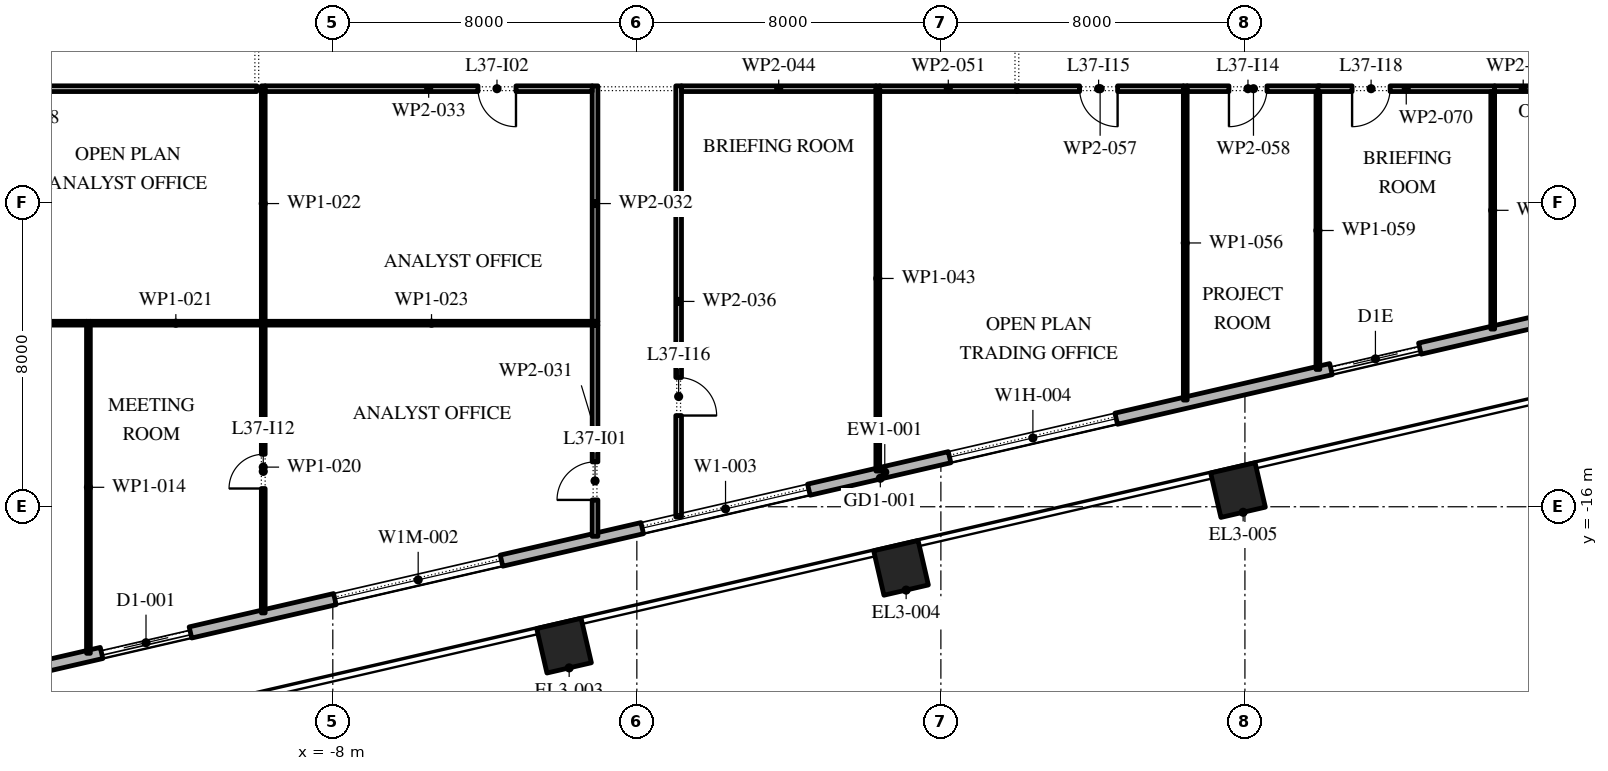
"""IFC4 building model, lengths in metres.
Left out: names, types, materials, properties, quantities, classifications, styles, units other than length and angle.
Written with IfcOpenShell. Run it as: python <this file> out.ifc"""

import sys

from ifc_helpers import new_model, si_unit, direction, frame, frame_2d, origin, origin_2d, place, context, subcontext, project, spatial, rectangle, extrude, element, fill, save


model = new_model("IFC4")
c1 = context("Model", 3, precision=1e-05, world=origin(), true_north=direction((0.0, 1.0)))
c2 = subcontext(c1, "Body", "Model", "MODEL_VIEW")
j1 = project(units=[si_unit("LENGTHUNIT", "METRE"), si_unit("PLANEANGLEUNIT", "RADIAN")], contexts=[c1])
p1 = place(None, origin())
s1 = spatial("IfcSite", under=j1, at=p1, CompositionType="ELEMENT")
p2 = place(p1, origin())
s2 = spatial("IfcBuilding", under=s1, at=p2, CompositionType="ELEMENT")
p3 = place(p2, frame((0.0, 0.0, 171.6)))
s3 = spatial("IfcBuildingStorey", under=s2, at=p3, CompositionType="ELEMENT", Elevation=171.6)
for number, where, z_axis, x_axis in (
    (1, (-1.916, -19.655, 0.0), (0.0, 0.0, 1.0), (0.974, 0.225, 0.0)),
    (2, (6.951, -17.608, 0.0), (0.0, 0.0, 1.0), (0.974, 0.225, 0.0)),
    (3, (15.818, -15.561, 0.0), (0.0, 0.0, 1.0), (0.974, 0.225, 0.0)),
):
    element("IfcColumn", number, at=place(p3, frame(where, z_axis=z_axis, x_axis=x_axis)), inside=s3, PredefinedType="COLUMN", context=c2, shape_type="SweptSolid", body=[
        extrude(rectangle(XDim=1.2, YDim=1.2, at=origin_2d()), origin(), (0.0, 0.0, 1.0), 4.2),
    ])
p4 = place(p3, frame((-17.592, -20.657, 0.0), z_axis=(0.0, 0.0, 1.0), x_axis=(0.974370243697, 0.224950279389, 0.0)))
e4 = element("IfcWall", 4, at=p4, inside=s3, PredefinedType="STANDARD", context=c2, shape_type="SweptSolid", body=[
    extrude(rectangle(XDim=49.5, YDim=0.3, at=frame_2d((24.75, 0.0))), origin(), (0.0, 0.0, 1.0), 4.0),
])
p5 = place(p4, frame((3.6, 0.0, 0.0)))
e5 = element("IfcOpeningElement", 5, at=p5, cuts=e4, PredefinedType="OPENING", context=c2, shape_type="SweptSolid", body=[
    extrude(rectangle(XDim=2.4, YDim=3.5, at=frame_2d((1.2, 1.75))), frame((0.0, 0.16, 0.0), z_axis=(0.0, -1.0, 0.0), x_axis=(1.0, 0.0, 0.0)), (0.0, 0.0, 1.0), 0.32),
])
p6 = place(p4, frame((9.9, 0.0, 0.45)))
e6 = element("IfcOpeningElement", 6, at=p6, cuts=e4, PredefinedType="OPENING", context=c2, shape_type="SweptSolid", body=[
    extrude(rectangle(XDim=4.5, YDim=2.575, at=frame_2d((2.25, 1.288))), frame((0.0, 0.16, 0.0), z_axis=(0.0, -1.0, 0.0), x_axis=(1.0, 0.0, 0.0)), (0.0, 0.0, 1.0), 0.32),
])
p7 = place(p4, frame((18.2, 0.0, 0.45)))
e7 = element("IfcOpeningElement", 7, at=p7, cuts=e4, PredefinedType="OPENING", context=c2, shape_type="SweptSolid", body=[
    extrude(rectangle(XDim=4.5, YDim=3.05, at=frame_2d((2.25, 1.525))), frame((0.0, 0.16, 0.0), z_axis=(0.0, -1.0, 0.0), x_axis=(1.0, 0.0, 0.0)), (0.0, 0.0, 1.0), 0.32),
])
p8 = place(p4, frame((26.5, 0.0, 0.45)))
e8 = element("IfcOpeningElement", 8, at=p8, cuts=e4, PredefinedType="OPENING", context=c2, shape_type="SweptSolid", body=[
    extrude(rectangle(XDim=4.5, YDim=2.75, at=frame_2d((2.25, 1.375))), frame((0.0, 0.16, 0.0), z_axis=(0.0, -1.0, 0.0), x_axis=(1.0, 0.0, 0.0)), (0.0, 0.0, 1.0), 0.32),
])
p9 = place(p4, frame((36.8, 0.0, 0.0)))
e9 = element("IfcOpeningElement", 9, at=p9, cuts=e4, PredefinedType="OPENING", context=c2, shape_type="SweptSolid", body=[
    extrude(rectangle(XDim=2.4, YDim=3.275, at=frame_2d((1.2, 1.637))), frame((0.0, 0.16, 0.0), z_axis=(0.0, -1.0, 0.0), x_axis=(1.0, 0.0, 0.0)), (0.0, 0.0, 1.0), 0.32),
])
p10 = place(p4, frame((43.1, 0.0, 0.45)))
e10 = element("IfcOpeningElement", 10, at=p10, cuts=e4, PredefinedType="OPENING", context=c2, shape_type="SweptSolid", body=[
    extrude(rectangle(XDim=4.5, YDim=2.875, at=frame_2d((2.25, 1.438))), frame((0.0, 0.16, 0.0), z_axis=(0.0, -1.0, 0.0), x_axis=(1.0, 0.0, 0.0)), (0.0, 0.0, 1.0), 0.32),
])
p11 = place(p3, frame((33.157, -5.092, 0.0), z_axis=(0.0, 0.0, 1.0), x_axis=(-0.224950279389, 0.974370243697, 0.0)))
e11 = element("IfcWall", 11, at=p11, inside=s3, PredefinedType="STANDARD", context=c2, shape_type="SweptSolid", body=[
    extrude(rectangle(XDim=49.5, YDim=0.3, at=frame_2d((24.75, 0.0))), origin(), (0.0, 0.0, 1.0), 4.0),
])
p12 = place(p11, frame((2.207, 0.0, 0.0)))
e12 = element("IfcOpeningElement", 12, at=p12, cuts=e11, PredefinedType="OPENING", context=c2, shape_type="SweptSolid", body=[
    extrude(rectangle(XDim=2.4, YDim=3.125, at=frame_2d((1.2, 1.562))), frame((0.0, 0.16, 0.0), z_axis=(0.0, -1.0, 0.0), x_axis=(1.0, 0.0, 0.0)), (0.0, 0.0, 1.0), 0.32),
])
p13 = place(p11, frame((8.121, 0.0, 0.45)))
e13 = element("IfcOpeningElement", 13, at=p13, cuts=e11, PredefinedType="OPENING", context=c2, shape_type="SweptSolid", body=[
    extrude(rectangle(XDim=4.5, YDim=2.875, at=frame_2d((2.25, 1.438))), frame((0.0, 0.16, 0.0), z_axis=(0.0, -1.0, 0.0), x_axis=(1.0, 0.0, 0.0)), (0.0, 0.0, 1.0), 0.32),
])
p14 = place(p11, frame((15.236, 0.0, 0.45)))
e14 = element("IfcOpeningElement", 14, at=p14, cuts=e11, PredefinedType="OPENING", context=c2, shape_type="SweptSolid", body=[
    extrude(rectangle(XDim=4.5, YDim=2.875, at=frame_2d((2.25, 1.438))), frame((0.0, 0.16, 0.0), z_axis=(0.0, -1.0, 0.0), x_axis=(1.0, 0.0, 0.0)), (0.0, 0.0, 1.0), 0.32),
])
p15 = place(p11, frame((22.35, 0.0, 0.45)))
e15 = element("IfcOpeningElement", 15, at=p15, cuts=e11, PredefinedType="OPENING", context=c2, shape_type="SweptSolid", body=[
    extrude(rectangle(XDim=4.5, YDim=3.0, at=frame_2d((2.25, 1.5))), frame((0.0, 0.16, 0.0), z_axis=(0.0, -1.0, 0.0), x_axis=(1.0, 0.0, 0.0)), (0.0, 0.0, 1.0), 0.32),
])
p16 = place(p11, frame((30.514, 0.0, 0.0)))
e16 = element("IfcOpeningElement", 16, at=p16, cuts=e11, PredefinedType="OPENING", context=c2, shape_type="SweptSolid", body=[
    extrude(rectangle(XDim=2.4, YDim=3.45, at=frame_2d((1.2, 1.725))), frame((0.0, 0.16, 0.0), z_axis=(0.0, -1.0, 0.0), x_axis=(1.0, 0.0, 0.0)), (0.0, 0.0, 1.0), 0.32),
])
p17 = place(p11, frame((36.579, 0.0, 0.45)))
e17 = element("IfcOpeningElement", 17, at=p17, cuts=e11, PredefinedType="OPENING", context=c2, shape_type="SweptSolid", body=[
    extrude(rectangle(XDim=4.5, YDim=3.05, at=frame_2d((2.25, 1.525))), frame((0.0, 0.16, 0.0), z_axis=(0.0, -1.0, 0.0), x_axis=(1.0, 0.0, 0.0)), (0.0, 0.0, 1.0), 0.32),
])
p18 = place(p11, frame((43.693, 0.0, 0.45)))
e18 = element("IfcOpeningElement", 18, at=p18, cuts=e11, PredefinedType="OPENING", context=c2, shape_type="SweptSolid", body=[
    extrude(rectangle(XDim=4.5, YDim=3.05, at=frame_2d((2.25, 1.525))), frame((0.0, 0.16, 0.0), z_axis=(0.0, -1.0, 0.0), x_axis=(1.0, 0.0, 0.0)), (0.0, 0.0, 1.0), 0.32),
])
p19 = place(p3, frame((-14.43, -19.856, 0.0), z_axis=(0.0, 0.0, 1.0), x_axis=(0.0, 1.0, 0.0)))
e19 = element("IfcWall", 19, at=p19, inside=s3, PredefinedType="PARTITIONING", context=c2, shape_type="SweptSolid", body=[
    extrude(rectangle(XDim=8.736, YDim=0.1, at=frame_2d((4.368, 0.0))), origin(), (0.0, 0.0, 1.0), 4.0),
])
p20 = place(p3, frame((-14.48, -11.17, 0.0), z_axis=(0.0, 0.0, 1.0), x_axis=(-1.0, 0.0, 0.0)))
e20 = element("IfcWall", 20, at=p20, inside=s3, PredefinedType="PARTITIONING", context=c2, shape_type="SweptSolid", body=[
    extrude(rectangle(XDim=9.08, YDim=0.1, at=frame_2d((4.54, 0.0))), origin(), (0.0, 0.0, 1.0), 4.0),
])
p21 = place(p20, frame((3.21, 0.0, 0.0)))
e21 = element("IfcOpeningElement", 21, at=p21, cuts=e20, PredefinedType="OPENING", context=c2, shape_type="SweptSolid", body=[
    extrude(rectangle(XDim=0.9, YDim=2.1, at=frame_2d((0.45, 1.05))), frame((0.0, 0.06, 0.0), z_axis=(0.0, -1.0, 0.0), x_axis=(1.0, 0.0, 0.0)), (0.0, 0.0, 1.0), 0.12),
])
p22 = place(p3, frame((-10.0, -5.0, 0.0), z_axis=(0.0, 0.0, 1.0), x_axis=(-1.0, 0.0, 0.0)))
e22 = element("IfcWall", 22, at=p22, inside=s3, PredefinedType="PARTITIONING", context=c2, shape_type="SweptSolid", body=[
    extrude(rectangle(XDim=13.925, YDim=0.15, at=frame_2d((6.962, 0.0))), origin(), (0.0, 0.0, 1.0), 4.0),
])
p23 = place(p22, frame((7.85, 0.0, 0.0)))
e23 = element("IfcOpeningElement", 23, at=p23, cuts=e22, PredefinedType="OPENING", context=c2, shape_type="SweptSolid", body=[
    extrude(rectangle(XDim=1.0, YDim=2.1, at=frame_2d((0.5, 1.05))), frame((0.0, 0.085, 0.0), z_axis=(0.0, -1.0, 0.0), x_axis=(1.0, 0.0, 0.0)), (0.0, 0.0, 1.0), 0.17),
])
p24 = place(p3, frame((-9.83, -18.794, 0.0), z_axis=(0.0, 0.0, 1.0), x_axis=(0.0, 1.0, 0.0)))
e24 = element("IfcWall", 24, at=p24, inside=s3, PredefinedType="PARTITIONING", context=c2, shape_type="SweptSolid", body=[
    extrude(rectangle(XDim=7.674, YDim=0.1, at=frame_2d((3.837, 0.0))), origin(), (0.0, 0.0, 1.0), 4.0),
])
p25 = place(p24, frame((3.274, 0.0, 0.0)))
e25 = element("IfcOpeningElement", 25, at=p25, cuts=e24, PredefinedType="OPENING", context=c2, shape_type="SweptSolid", body=[
    extrude(rectangle(XDim=0.9, YDim=2.1, at=frame_2d((0.45, 1.05))), frame((0.0, 0.06, 0.0), z_axis=(0.0, -1.0, 0.0), x_axis=(1.0, 0.0, 0.0)), (0.0, 0.0, 1.0), 0.12),
])
p26 = place(p3, frame((-9.88, -11.17, 0.0), z_axis=(0.0, 0.0, 1.0), x_axis=(-1.0, 0.0, 0.0)))
e26 = element("IfcWall", 26, at=p26, inside=s3, PredefinedType="PARTITIONING", context=c2, shape_type="SweptSolid", body=[
    extrude(rectangle(XDim=4.5, YDim=0.1, at=frame_2d((2.25, 0.0))), origin(), (0.0, 0.0, 1.0), 4.0),
])
p27 = place(p3, frame((-9.83, -11.12, 0.0), z_axis=(0.0, 0.0, 1.0), x_axis=(0.0, 1.0, 0.0)))
e27 = element("IfcWall", 27, at=p27, inside=s3, PredefinedType="PARTITIONING", context=c2, shape_type="SweptSolid", body=[
    extrude(rectangle(XDim=6.195, YDim=0.1, at=frame_2d((3.098, 0.0))), origin(), (0.0, 0.0, 1.0), 4.0),
])
p28 = place(p3, frame((-9.78, -11.17, 0.0), z_axis=(0.0, 0.0, 1.0), x_axis=(1.0, 0.0, 0.0)))
e28 = element("IfcWall", 28, at=p28, inside=s3, PredefinedType="PARTITIONING", context=c2, shape_type="SweptSolid", body=[
    extrude(rectangle(XDim=8.755, YDim=0.1, at=frame_2d((4.377, 0.0))), origin(), (0.0, 0.0, 1.0), 4.0),
])
p29 = place(p3, frame((-1.1, -16.778, 0.0), z_axis=(0.0, 0.0, 1.0), x_axis=(0.0, 1.0, 0.0)))
e29 = element("IfcWall", 29, at=p29, inside=s3, PredefinedType="PARTITIONING", context=c2, shape_type="SweptSolid", body=[
    extrude(rectangle(XDim=5.558, YDim=0.15, at=frame_2d((2.779, 0.0))), origin(), (0.0, 0.0, 1.0), 4.0),
])
p30 = place(p29, frame((0.958, 0.0, 0.0)))
e30 = element("IfcOpeningElement", 30, at=p30, cuts=e29, PredefinedType="OPENING", context=c2, shape_type="SweptSolid", body=[
    extrude(rectangle(XDim=1.0, YDim=2.1, at=frame_2d((0.5, 1.05))), frame((0.0, 0.085, 0.0), z_axis=(0.0, -1.0, 0.0), x_axis=(1.0, 0.0, 0.0)), (0.0, 0.0, 1.0), 0.17),
])
p31 = place(p3, frame((-1.1, -11.12, 0.0), z_axis=(0.0, 0.0, 1.0), x_axis=(0.0, 1.0, 0.0)))
e31 = element("IfcWall", 31, at=p31, inside=s3, PredefinedType="PARTITIONING", context=c2, shape_type="SweptSolid", body=[
    extrude(rectangle(XDim=6.195, YDim=0.15, at=frame_2d((3.098, 0.0))), origin(), (0.0, 0.0, 1.0), 4.0),
])
p32 = place(p3, frame((-1.175, -5.0, 0.0), z_axis=(0.0, 0.0, 1.0), x_axis=(-1.0, 0.0, 0.0)))
e32 = element("IfcWall", 32, at=p32, inside=s3, PredefinedType="PARTITIONING", context=c2, shape_type="SweptSolid", body=[
    extrude(rectangle(XDim=8.605, YDim=0.15, at=frame_2d((4.302, 0.0))), origin(), (0.0, 0.0, 1.0), 4.0),
])
p33 = place(p32, frame((2.005, 0.0, 0.0)))
e33 = element("IfcOpeningElement", 33, at=p33, cuts=e32, PredefinedType="OPENING", context=c2, shape_type="SweptSolid", body=[
    extrude(rectangle(XDim=1.0, YDim=2.1, at=frame_2d((0.5, 1.05))), frame((0.0, 0.085, 0.0), z_axis=(0.0, -1.0, 0.0), x_axis=(1.0, 0.0, 0.0)), (0.0, 0.0, 1.0), 0.17),
])
p34 = place(p3, frame((1.1, -4.925, 0.0), z_axis=(0.0, 0.0, 1.0), x_axis=(0.0, -1.0, 0.0)))
e34 = element("IfcWall", 34, at=p34, inside=s3, PredefinedType="PARTITIONING", context=c2, shape_type="SweptSolid", body=[
    extrude(rectangle(XDim=11.345, YDim=0.15, at=frame_2d((5.672, 0.0))), origin(), (0.0, 0.0, 1.0), 4.0),
])
p35 = place(p34, frame((7.675, 0.0, 0.0)))
e35 = element("IfcOpeningElement", 35, at=p35, cuts=e34, PredefinedType="OPENING", context=c2, shape_type="SweptSolid", body=[
    extrude(rectangle(XDim=1.0, YDim=2.1, at=frame_2d((0.5, 1.05))), frame((0.0, 0.085, 0.0), z_axis=(0.0, -1.0, 0.0), x_axis=(1.0, 0.0, 0.0)), (0.0, 0.0, 1.0), 0.17),
])
p36 = place(p3, frame((6.34, -15.061, 0.0), z_axis=(0.0, 0.0, 1.0), x_axis=(0.0, 1.0, 0.0)))
e36 = element("IfcWall", 36, at=p36, inside=s3, PredefinedType="PARTITIONING", context=c2, shape_type="SweptSolid", body=[
    extrude(rectangle(XDim=10.136, YDim=0.1, at=frame_2d((5.068, 0.0))), origin(), (0.0, 0.0, 1.0), 4.0),
])
p37 = place(p3, frame((6.29, -5.0, 0.0), z_axis=(0.0, 0.0, 1.0), x_axis=(-1.0, 0.0, 0.0)))
e37 = element("IfcWall", 37, at=p37, inside=s3, PredefinedType="PARTITIONING", context=c2, shape_type="SweptSolid", body=[
    extrude(rectangle(XDim=5.115, YDim=0.15, at=frame_2d((2.558, 0.0))), origin(), (0.0, 0.0, 1.0), 4.0),
])
p38 = place(p3, frame((10.0, -5.0, 0.0), z_axis=(0.0, 0.0, 1.0), x_axis=(-1.0, 0.0, 0.0)))
e38 = element("IfcWall", 38, at=p38, inside=s3, PredefinedType="PARTITIONING", context=c2, shape_type="SweptSolid", body=[
    extrude(rectangle(XDim=3.61, YDim=0.15, at=frame_2d((1.805, 0.0))), origin(), (0.0, 0.0, 1.0), 4.0),
])
p39 = place(p3, frame((14.43, -13.193, 0.0), z_axis=(0.0, 0.0, 1.0), x_axis=(0.0, 1.0, 0.0)))
e39 = element("IfcWall", 39, at=p39, inside=s3, PredefinedType="PARTITIONING", context=c2, shape_type="SweptSolid", body=[
    extrude(rectangle(XDim=8.268, YDim=0.1, at=frame_2d((4.134, 0.0))), origin(), (0.0, 0.0, 1.0), 4.0),
])
p40 = place(p3, frame((14.38, -5.0, 0.0), z_axis=(0.0, 0.0, 1.0), x_axis=(-1.0, 0.0, 0.0)))
e40 = element("IfcWall", 40, at=p40, inside=s3, PredefinedType="PARTITIONING", context=c2, shape_type="SweptSolid", body=[
    extrude(rectangle(XDim=4.38, YDim=0.15, at=frame_2d((2.19, 0.0))), origin(), (0.0, 0.0, 1.0), 4.0),
])
p41 = place(p40, frame((1.73, 0.0, 0.0)))
e41 = element("IfcOpeningElement", 41, at=p41, cuts=e40, PredefinedType="OPENING", context=c2, shape_type="SweptSolid", body=[
    extrude(rectangle(XDim=1.0, YDim=2.1, at=frame_2d((0.5, 1.05))), frame((0.0, 0.085, 0.0), z_axis=(0.0, -1.0, 0.0), x_axis=(1.0, 0.0, 0.0)), (0.0, 0.0, 1.0), 0.17),
])
p42 = place(p3, frame((17.97, -5.0, 0.0), z_axis=(0.0, 0.0, 1.0), x_axis=(-1.0, 0.0, 0.0)))
e42 = element("IfcWall", 42, at=p42, inside=s3, PredefinedType="PARTITIONING", context=c2, shape_type="SweptSolid", body=[
    extrude(rectangle(XDim=3.49, YDim=0.15, at=frame_2d((1.745, 0.0))), origin(), (0.0, 0.0, 1.0), 4.0),
])
p43 = place(p42, frame((1.39, 0.0, 0.0)))
e43 = element("IfcOpeningElement", 43, at=p43, cuts=e42, PredefinedType="OPENING", context=c2, shape_type="SweptSolid", body=[
    extrude(rectangle(XDim=1.0, YDim=2.1, at=frame_2d((0.5, 1.05))), frame((0.0, 0.085, 0.0), z_axis=(0.0, -1.0, 0.0), x_axis=(1.0, 0.0, 0.0)), (0.0, 0.0, 1.0), 0.17),
])
p44 = place(p3, frame((17.92, -5.075, 0.0), z_axis=(0.0, 0.0, 1.0), x_axis=(0.0, -1.0, 0.0)))
e44 = element("IfcWall", 44, at=p44, inside=s3, PredefinedType="PARTITIONING", context=c2, shape_type="SweptSolid", body=[
    extrude(rectangle(XDim=7.312, YDim=0.1, at=frame_2d((3.656, 0.0))), origin(), (0.0, 0.0, 1.0), 4.0),
])
p45 = place(p3, frame((22.57, -5.0, 0.0), z_axis=(0.0, 0.0, 1.0), x_axis=(-1.0, 0.0, 0.0)))
e45 = element("IfcWall", 45, at=p45, inside=s3, PredefinedType="PARTITIONING", context=c2, shape_type="SweptSolid", body=[
    extrude(rectangle(XDim=4.65, YDim=0.15, at=frame_2d((2.325, 0.0))), origin(), (0.0, 0.0, 1.0), 4.0),
])
p46 = place(p45, frame((2.75, 0.0, 0.0)))
e46 = element("IfcOpeningElement", 46, at=p46, cuts=e45, PredefinedType="OPENING", context=c2, shape_type="SweptSolid", body=[
    extrude(rectangle(XDim=1.0, YDim=2.1, at=frame_2d((0.5, 1.05))), frame((0.0, 0.085, 0.0), z_axis=(0.0, -1.0, 0.0), x_axis=(1.0, 0.0, 0.0)), (0.0, 0.0, 1.0), 0.17),
])
p47 = place(p3, frame((22.52, -5.075, 0.0), z_axis=(0.0, 0.0, 1.0), x_axis=(0.0, -1.0, 0.0)))
e47 = element("IfcWall", 47, at=p47, inside=s3, PredefinedType="PARTITIONING", context=c2, shape_type="SweptSolid", body=[
    extrude(rectangle(XDim=6.25, YDim=0.1, at=frame_2d((3.125, 0.0))), origin(), (0.0, 0.0, 1.0), 4.0),
])
p48 = place(p3, frame((24.075, -5.0, 0.0), z_axis=(0.0, 0.0, 1.0), x_axis=(-1.0, 0.0, 0.0)))
e48 = element("IfcWall", 48, at=p48, inside=s3, PredefinedType="PARTITIONING", context=c2, shape_type="SweptSolid", body=[
    extrude(rectangle(XDim=1.505, YDim=0.15, at=frame_2d((0.752, 0.0))), origin(), (0.0, 0.0, 1.0), 4.0),
])
p49 = place(p5, origin())
e49 = element("IfcDoor", 49, at=p49, inside=s3, OperationType="DOUBLE_DOOR_SLIDING", PredefinedType="DOOR", context=c2, shape_type="SweptSolid", body=[
    extrude(rectangle(XDim=2.4, YDim=3.5, at=frame_2d((1.2, 1.75))), frame((0.0, 0.025, 0.0), z_axis=(0.0, -1.0, 0.0), x_axis=(1.0, 0.0, 0.0)), (0.0, 0.0, 1.0), 0.05),
])
fill(e5, e49)
p50 = place(p6, origin())
e50 = element("IfcWindow", 50, at=p50, inside=s3, PartitioningType="DOUBLE_PANEL_VERTICAL", PredefinedType="WINDOW", context=c2, shape_type="SweptSolid", body=[
    extrude(rectangle(XDim=4.5, YDim=2.575, at=frame_2d((2.25, 1.288))), frame((0.0, 0.03, 0.0), z_axis=(0.0, -1.0, 0.0), x_axis=(1.0, 0.0, 0.0)), (0.0, 0.0, 1.0), 0.06),
])
fill(e6, e50)
p51 = place(p7, origin())
e51 = element("IfcWindow", 51, at=p51, inside=s3, PartitioningType="DOUBLE_PANEL_VERTICAL", PredefinedType="WINDOW", context=c2, shape_type="SweptSolid", body=[
    extrude(rectangle(XDim=4.5, YDim=3.05, at=frame_2d((2.25, 1.525))), frame((0.0, 0.03, 0.0), z_axis=(0.0, -1.0, 0.0), x_axis=(1.0, 0.0, 0.0)), (0.0, 0.0, 1.0), 0.06),
])
fill(e7, e51)
p52 = place(p8, origin())
e52 = element("IfcWindow", 52, at=p52, inside=s3, PartitioningType="DOUBLE_PANEL_VERTICAL", PredefinedType="WINDOW", context=c2, shape_type="SweptSolid", body=[
    extrude(rectangle(XDim=4.5, YDim=2.75, at=frame_2d((2.25, 1.375))), frame((0.0, 0.03, 0.0), z_axis=(0.0, -1.0, 0.0), x_axis=(1.0, 0.0, 0.0)), (0.0, 0.0, 1.0), 0.06),
])
fill(e8, e52)
p53 = place(p9, origin())
e53 = element("IfcDoor", 53, at=p53, inside=s3, OperationType="DOUBLE_DOOR_SLIDING", PredefinedType="DOOR", context=c2, shape_type="SweptSolid", body=[
    extrude(rectangle(XDim=2.4, YDim=3.275, at=frame_2d((1.2, 1.637))), frame((0.0, 0.025, 0.0), z_axis=(0.0, -1.0, 0.0), x_axis=(1.0, 0.0, 0.0)), (0.0, 0.0, 1.0), 0.05),
])
fill(e9, e53)
p54 = place(p30, origin())
e54 = element("IfcDoor", 54, at=p54, inside=s3, OperationType="SINGLE_SWING_RIGHT", PredefinedType="DOOR", context=c2, shape_type="SweptSolid", body=[
    extrude(rectangle(XDim=1.0, YDim=2.1, at=frame_2d((0.5, 1.05))), frame((0.0, 0.025, 0.0), z_axis=(0.0, -1.0, 0.0), x_axis=(1.0, 0.0, 0.0)), (0.0, 0.0, 1.0), 0.05),
])
fill(e30, e54)
p55 = place(p33, origin())
e55 = element("IfcDoor", 55, at=p55, inside=s3, OperationType="SINGLE_SWING_RIGHT", PredefinedType="DOOR", context=c2, shape_type="SweptSolid", body=[
    extrude(rectangle(XDim=1.0, YDim=2.1, at=frame_2d((0.5, 1.05))), frame((0.0, 0.025, 0.0), z_axis=(0.0, -1.0, 0.0), x_axis=(1.0, 0.0, 0.0)), (0.0, 0.0, 1.0), 0.05),
])
fill(e33, e55)
p56 = place(p25, origin())
e56 = element("IfcDoor", 56, at=p56, inside=s3, OperationType="SINGLE_SWING_RIGHT", PredefinedType="DOOR", context=c2, shape_type="SweptSolid", body=[
    extrude(rectangle(XDim=0.9, YDim=2.1, at=frame_2d((0.45, 1.05))), frame((0.0, 0.025, 0.0), z_axis=(0.0, -1.0, 0.0), x_axis=(1.0, 0.0, 0.0)), (0.0, 0.0, 1.0), 0.05),
])
fill(e25, e56)
p57 = place(p43, origin())
e57 = element("IfcDoor", 57, at=p57, inside=s3, OperationType="SINGLE_SWING_LEFT", PredefinedType="DOOR", context=c2, shape_type="SweptSolid", body=[
    extrude(rectangle(XDim=1.0, YDim=2.1, at=frame_2d((0.5, 1.05))), frame((0.0, 0.025, 0.0), z_axis=(0.0, -1.0, 0.0), x_axis=(1.0, 0.0, 0.0)), (0.0, 0.0, 1.0), 0.05),
])
fill(e43, e57)
p58 = place(p41, origin())
e58 = element("IfcDoor", 58, at=p58, inside=s3, OperationType="SINGLE_SWING_RIGHT", PredefinedType="DOOR", context=c2, shape_type="SweptSolid", body=[
    extrude(rectangle(XDim=1.0, YDim=2.1, at=frame_2d((0.5, 1.05))), frame((0.0, 0.025, 0.0), z_axis=(0.0, -1.0, 0.0), x_axis=(1.0, 0.0, 0.0)), (0.0, 0.0, 1.0), 0.05),
])
fill(e41, e58)
p59 = place(p35, origin())
e59 = element("IfcDoor", 59, at=p59, inside=s3, OperationType="SINGLE_SWING_LEFT", PredefinedType="DOOR", context=c2, shape_type="SweptSolid", body=[
    extrude(rectangle(XDim=1.0, YDim=2.1, at=frame_2d((0.5, 1.05))), frame((0.0, 0.025, 0.0), z_axis=(0.0, -1.0, 0.0), x_axis=(1.0, 0.0, 0.0)), (0.0, 0.0, 1.0), 0.05),
])
fill(e35, e59)
p60 = place(p46, origin())
e60 = element("IfcDoor", 60, at=p60, inside=s3, OperationType="SINGLE_SWING_LEFT", PredefinedType="DOOR", context=c2, shape_type="SweptSolid", body=[
    extrude(rectangle(XDim=1.0, YDim=2.1, at=frame_2d((0.5, 1.05))), frame((0.0, 0.025, 0.0), z_axis=(0.0, -1.0, 0.0), x_axis=(1.0, 0.0, 0.0)), (0.0, 0.0, 1.0), 0.05),
])
fill(e46, e60)
save(model, sys.argv[1])
